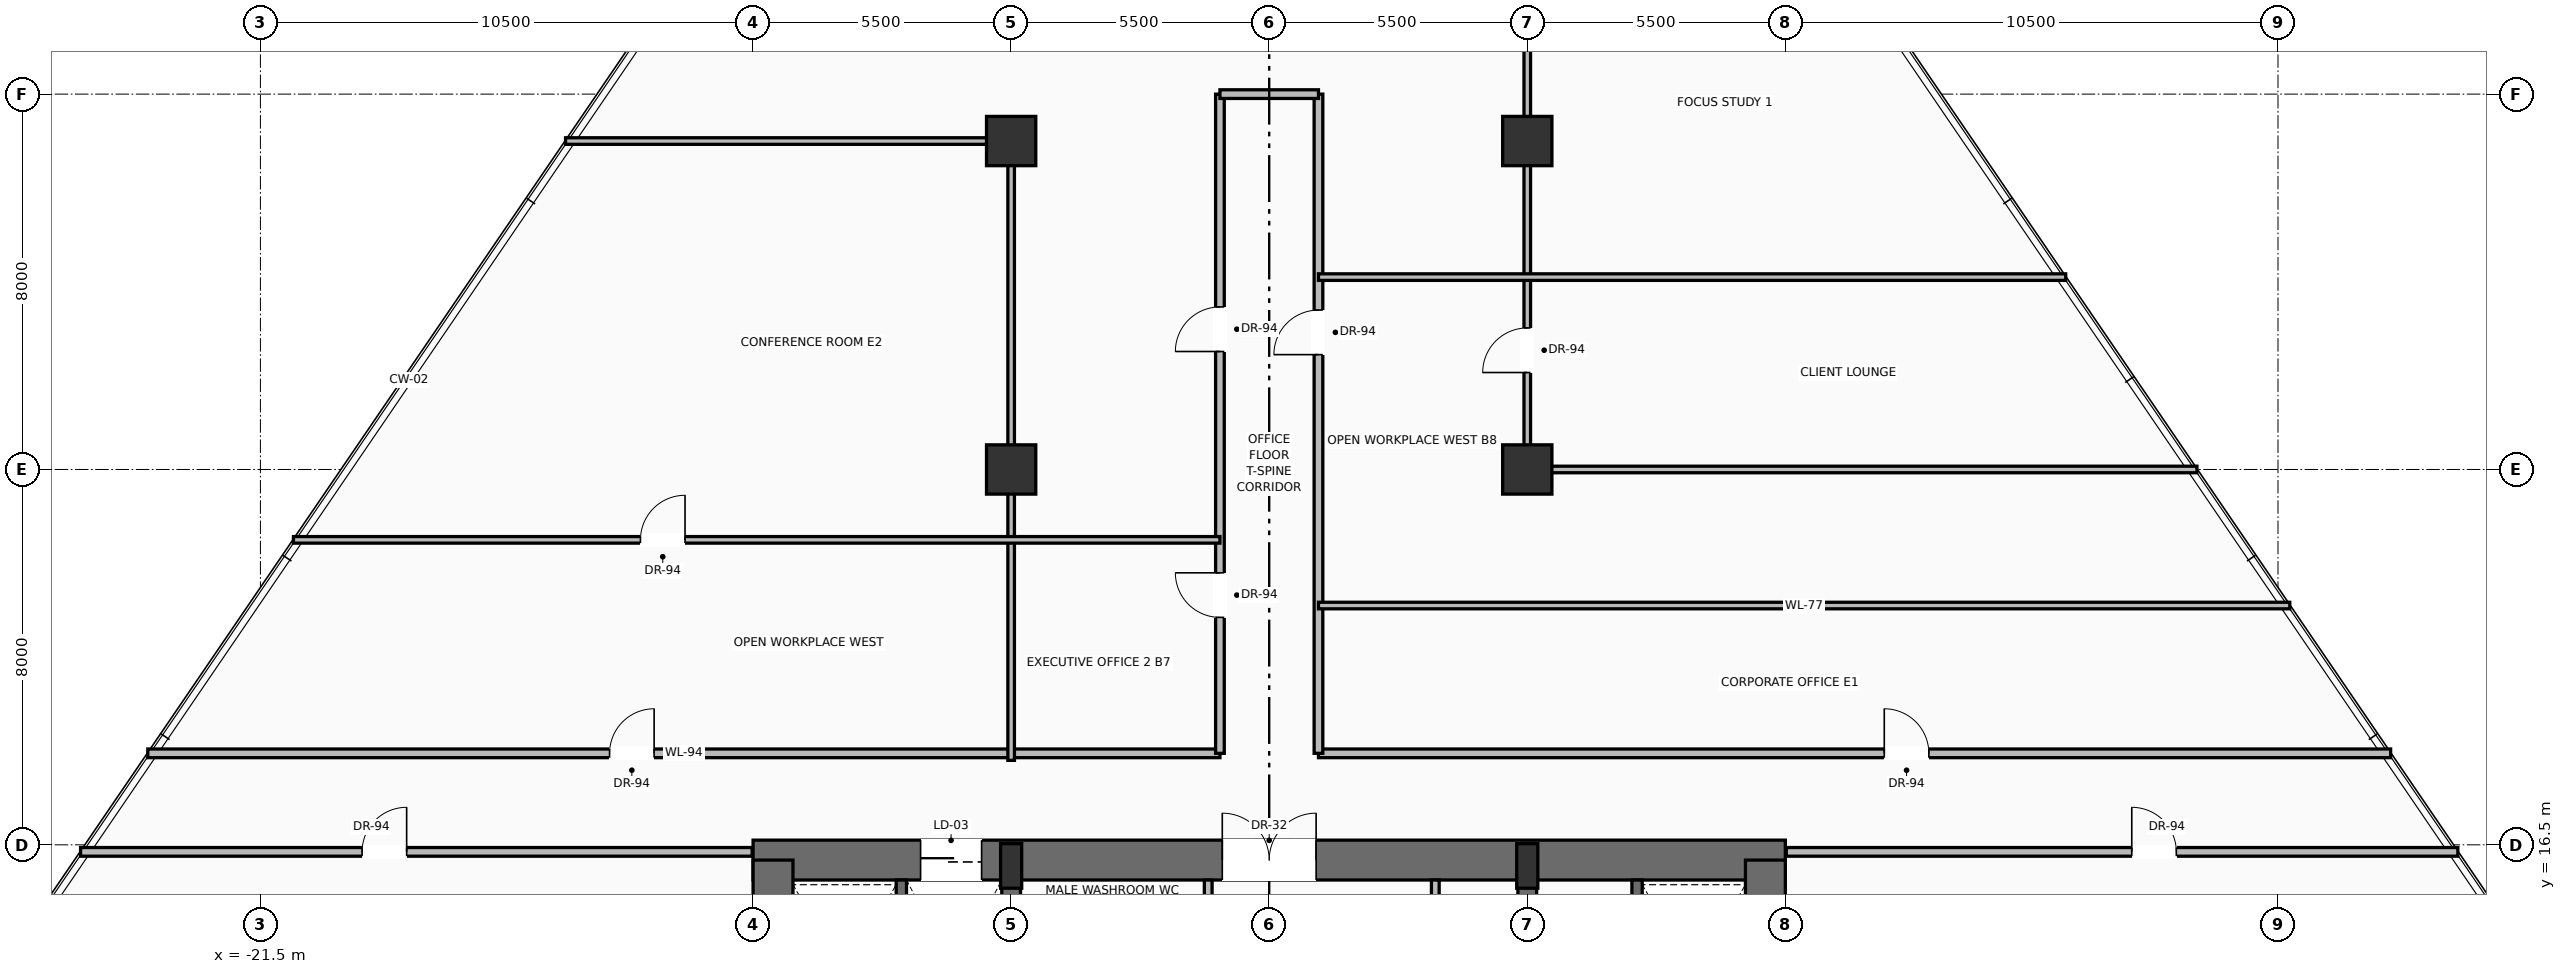
"""IFC4 building model, lengths in metres.
Left out: names, types, materials, properties, quantities, classifications, styles, units other than length and angle.
Written with IfcOpenShell. Run it as: python <this file> out.ifc"""

import sys

from ifc_helpers import new_model, si_unit, direction, frame, frame_2d, origin, origin_2d, place, context, subcontext, project, spatial, rectangle, extrude, source, transform, mapped, element, fill, save


model = new_model("IFC4")
c1 = context("Model", 3, precision=1e-05, world=origin(), true_north=direction((0.0, 1.0)))
c2 = subcontext(c1, "Body", "Model", "MODEL_VIEW")
j1 = project(units=[si_unit("LENGTHUNIT", "METRE"), si_unit("PLANEANGLEUNIT", "RADIAN")], contexts=[c1])
p1 = place(None, origin())
s1 = spatial("IfcSite", under=j1, at=p1, CompositionType="ELEMENT")
p2 = place(p1, origin())
s2 = spatial("IfcBuilding", under=s1, at=p2, CompositionType="ELEMENT")
p3 = place(p2, frame((0.0, 0.0, 27.5)))
s3 = spatial("IfcBuildingStorey", under=s2, at=p3, CompositionType="ELEMENT", Elevation=27.5)
p4 = place(p3, frame((-11.0, 16.175, 0.0), z_axis=(0.0, 0.0, 1.0), x_axis=(1.0, 0.0, 0.0)))
e1 = element("IfcWall", 1, at=p4, inside=s3, PredefinedType="SHEAR", context=c2, shape_type="SweptSolid", body=[
    extrude(rectangle(XDim=22.0, YDim=0.85, at=frame_2d((11.0, 0.0))), origin(), (0.0, 0.0, 1.0), 3.45),
])
p5 = place(p4, frame((3.57, 0.0, 0.0)))
e2 = element("IfcOpeningElement", 2, at=p5, cuts=e1, PredefinedType="OPENING", context=c2, shape_type="SweptSolid", body=[
    extrude(rectangle(XDim=1.3, YDim=2.3, at=frame_2d((0.65, 1.15))), frame((0.0, 0.435, 0.0), z_axis=(0.0, -1.0, 0.0), x_axis=(1.0, 0.0, 0.0)), (0.0, 0.0, 1.0), 0.87),
])
p6 = place(p4, frame((10.0, 0.0, 0.0)))
e3 = element("IfcOpeningElement", 3, at=p6, cuts=e1, PredefinedType="OPENING", context=c2, shape_type="SweptSolid", body=[
    extrude(rectangle(XDim=2.0, YDim=2.4, at=frame_2d((1.0, 1.2))), frame((0.0, 0.435, 0.0), z_axis=(0.0, -1.0, 0.0), x_axis=(1.0, 0.0, 0.0)), (0.0, 0.0, 1.0), 0.87),
])
for number, where, z_axis, x_axis in (
    (4, (-10.575, 0.425, 0.0), (0.0, 0.0, 1.0), (0.0, 1.0, 0.0)),
    (5, (10.575, 0.425, 0.0), (0.0, 0.0, 1.0), (0.0, 1.0, 0.0)),
):
    element("IfcWall", number, at=place(p3, frame(where, z_axis=z_axis, x_axis=x_axis)), inside=s3, PredefinedType="SHEAR", context=c2, shape_type="SweptSolid", body=[
        extrude(rectangle(XDim=15.75, YDim=0.85, at=frame_2d((7.875, 0.0))), origin(), (0.0, 0.0, 1.0), 3.45),
    ])
p7 = place(p3, frame((-5.5, 0.425, 0.0), z_axis=(0.0, 0.0, 1.0), x_axis=(0.0, 1.0, 0.0)))
e6 = element("IfcWall", 6, at=p7, inside=s3, PredefinedType="SHEAR", context=c2, shape_type="SweptSolid", body=[
    extrude(rectangle(XDim=15.75, YDim=0.4, at=frame_2d((7.875, 0.0))), origin(), (0.0, 0.0, 1.0), 3.45),
])
p8 = place(p7, frame((9.075, 0.0, 0.0)))
e7 = element("IfcOpeningElement", 7, at=p8, cuts=e6, PredefinedType="OPENING", context=c2, shape_type="SweptSolid", body=[
    extrude(rectangle(XDim=1.1, YDim=2.2, at=frame_2d((0.55, 1.1))), frame((0.0, 0.21, 0.0), z_axis=(0.0, -1.0, 0.0), x_axis=(1.0, 0.0, 0.0)), (0.0, 0.0, 1.0), 0.42),
])
p9 = place(p3, frame((5.5, 0.425, 0.0), z_axis=(0.0, 0.0, 1.0), x_axis=(0.0, 1.0, 0.0)))
e8 = element("IfcWall", 8, at=p9, inside=s3, PredefinedType="SHEAR", context=c2, shape_type="SweptSolid", body=[
    extrude(rectangle(XDim=15.75, YDim=0.4, at=frame_2d((7.875, 0.0))), origin(), (0.0, 0.0, 1.0), 3.45),
])
p10 = place(p9, frame((9.075, 0.0, 0.0)))
e9 = element("IfcOpeningElement", 9, at=p10, cuts=e8, PredefinedType="OPENING", context=c2, shape_type="SweptSolid", body=[
    extrude(rectangle(XDim=1.1, YDim=2.2, at=frame_2d((0.55, 1.1))), frame((0.0, 0.21, 0.0), z_axis=(0.0, -1.0, 0.0), x_axis=(1.0, 0.0, 0.0)), (0.0, 0.0, 1.0), 0.42),
])
m1 = source(origin(), c2, "Body", "SweptSolid", [
    extrude(rectangle(XDim=0.45, YDim=0.95, at=origin_2d()), origin(), (0.0, 0.0, 1.0), 3.7),
])
for number, where, z_axis, x_axis in (
    (10, (-5.5, 16.05, 0.0), (0.0, 0.0, 1.0), (1.0, 0.0, 0.0)),
    (11, (5.5, 16.05, 0.0), (0.0, 0.0, 1.0), (1.0, 0.0, 0.0)),
):
    element("IfcColumn", number, at=place(p3, frame(where, z_axis=z_axis, x_axis=x_axis)), inside=s3, PredefinedType="PILASTER", context=c2, shape_type="MappedRepresentation", body=[
        mapped(m1, transform((0.0, 0.0, 0.0), scale=1.0)),
    ])
m2 = source(origin(), c2, "Body", "SweptSolid", [
    extrude(rectangle(XDim=1.05, YDim=1.05, at=origin_2d()), origin(), (0.0, 0.0, 1.0), 3.7),
])
for number, where, z_axis, x_axis in (
    (12, (-5.5, 24.5, 0.0), (0.0, 0.0, 1.0), (1.0, 0.0, 0.0)),
    (13, (5.5, 24.5, 0.0), (0.0, 0.0, 1.0), (1.0, 0.0, 0.0)),
    (14, (-5.5, 31.5, 0.0), (0.0, 0.0, 1.0), (1.0, 0.0, 0.0)),
    (15, (5.5, 31.5, 0.0), (0.0, 0.0, 1.0), (1.0, 0.0, 0.0)),
):
    element("IfcColumn", number, at=place(p3, frame(where, z_axis=z_axis, x_axis=x_axis)), inside=s3, PredefinedType="COLUMN", context=c2, shape_type="MappedRepresentation", body=[
        mapped(m2, transform((0.0, 0.0, 0.0), scale=1.0)),
    ])
for number, where, z_axis, x_axis in (
    (16, (-7.84, 11.87, 0.0), (0.0, 0.0, 1.0), (0.0, 1.0, 0.0)),
    (17, (7.84, 11.87, 0.0), (0.0, 0.0, 1.0), (0.0, 1.0, 0.0)),
):
    element("IfcWall", number, at=place(p3, frame(where, z_axis=z_axis, x_axis=x_axis)), inside=s3, PredefinedType="SOLIDWALL", context=c2, shape_type="SweptSolid", body=[
        extrude(rectangle(XDim=3.88, YDim=0.22, at=frame_2d((1.94, 0.0))), origin(), (0.0, 0.0, 1.0), 3.45),
    ])
p11 = place(p3, frame((-1.3, 13.6, 0.0), z_axis=(0.0, 0.0, 1.0), x_axis=(0.0, 1.0, 0.0)))
e18 = element("IfcWall", 18, at=p11, inside=s3, PredefinedType="PARTITIONING", context=c2, shape_type="SweptSolid", body=[
    extrude(rectangle(XDim=2.15, YDim=0.165, at=frame_2d((1.075, 0.0))), origin(), (0.0, 0.0, 1.0), 3.442),
])
p12 = place(p11, frame((0.55, 0.0, 0.0)))
e19 = element("IfcOpeningElement", 19, at=p12, cuts=e18, PredefinedType="OPENING", context=c2, shape_type="SweptSolid", body=[
    extrude(rectangle(XDim=0.9, YDim=2.1, at=frame_2d((0.45, 1.05))), frame((0.0, 0.093, 0.0), z_axis=(0.0, -1.0, 0.0), x_axis=(1.0, 0.0, 0.0)), (0.0, 0.0, 1.0), 0.185),
])
p13 = place(p3, frame((3.54, 11.22, 0.0), z_axis=(0.0, 0.0, 1.0), x_axis=(0.0, 1.0, 0.0)))
e20 = element("IfcWall", 20, at=p13, inside=s3, PredefinedType="PARTITIONING", context=c2, shape_type="SweptSolid", body=[
    extrude(rectangle(XDim=4.53, YDim=0.165, at=frame_2d((2.265, 0.0))), origin(), (0.0, 0.0, 1.0), 3.442),
])
p14 = place(p13, frame((1.25, 0.0, 0.0)))
e21 = element("IfcOpeningElement", 21, at=p14, cuts=e20, PredefinedType="OPENING", context=c2, shape_type="SweptSolid", body=[
    extrude(rectangle(XDim=0.9, YDim=2.1, at=frame_2d((0.45, 1.05))), frame((0.0, 0.093, 0.0), z_axis=(0.0, -1.0, 0.0), x_axis=(1.0, 0.0, 0.0)), (0.0, 0.0, 1.0), 0.185),
])
p15 = place(p3, frame((-25.333, 16.35, 0.0), z_axis=(0.0, 0.0, 1.0), x_axis=(1.0, 0.0, 0.0)))
e22 = element("IfcWall", 22, at=p15, inside=s3, PredefinedType="PARTITIONING", context=c2, shape_type="SweptSolid", body=[
    extrude(rectangle(XDim=14.313, YDim=0.185, at=frame_2d((7.157, 0.0))), origin(), (0.0, 0.0, 1.0), 2.747),
])
p16 = place(p15, frame((6.0, 0.0, 0.0)))
e23 = element("IfcOpeningElement", 23, at=p16, cuts=e22, PredefinedType="OPENING", context=c2, shape_type="SweptSolid", body=[
    extrude(rectangle(XDim=0.95, YDim=2.2, at=frame_2d((0.475, 1.1))), frame((0.0, 0.103, 0.0), z_axis=(0.0, -1.0, 0.0), x_axis=(1.0, 0.0, 0.0)), (0.0, 0.0, 1.0), 0.205),
])
p17 = place(p3, frame((11.02, 16.35, 0.0), z_axis=(0.0, 0.0, 1.0), x_axis=(1.0, 0.0, 0.0)))
e24 = element("IfcWall", 24, at=p17, inside=s3, PredefinedType="PARTITIONING", context=c2, shape_type="SweptSolid", body=[
    extrude(rectangle(XDim=14.313, YDim=0.185, at=frame_2d((7.157, 0.0))), origin(), (0.0, 0.0, 1.0), 2.747),
])
p18 = place(p17, frame((7.363, 0.0, 0.0)))
e25 = element("IfcOpeningElement", 25, at=p18, cuts=e24, PredefinedType="OPENING", context=c2, shape_type="SweptSolid", body=[
    extrude(rectangle(XDim=0.95, YDim=2.2, at=frame_2d((0.475, 1.1))), frame((0.0, 0.103, 0.0), z_axis=(0.0, -1.0, 0.0), x_axis=(1.0, 0.0, 0.0)), (0.0, 0.0, 1.0), 0.205),
])
p19 = place(p3, frame((-23.9, 18.45, 0.0), z_axis=(0.0, 0.0, 1.0), x_axis=(1.0, 0.0, 0.0)))
e26 = element("IfcWall", 26, at=p19, inside=s3, PredefinedType="PARTITIONING", context=c2, shape_type="SweptSolid", body=[
    extrude(rectangle(XDim=22.85, YDim=0.185, at=frame_2d((11.425, 0.0))), origin(), (0.0, 0.0, 1.0), 2.747),
])
p20 = place(p19, frame((9.842, 0.0, 0.0)))
e27 = element("IfcOpeningElement", 27, at=p20, cuts=e26, PredefinedType="OPENING", context=c2, shape_type="SweptSolid", body=[
    extrude(rectangle(XDim=0.95, YDim=2.2, at=frame_2d((0.475, 1.1))), frame((0.0, 0.103, 0.0), z_axis=(0.0, -1.0, 0.0), x_axis=(1.0, 0.0, 0.0)), (0.0, 0.0, 1.0), 0.205),
])
p21 = place(p3, frame((1.05, 18.45, 0.0), z_axis=(0.0, 0.0, 1.0), x_axis=(1.0, 0.0, 0.0)))
e28 = element("IfcWall", 28, at=p21, inside=s3, PredefinedType="PARTITIONING", context=c2, shape_type="SweptSolid", body=[
    extrude(rectangle(XDim=22.85, YDim=0.185, at=frame_2d((11.425, 0.0))), origin(), (0.0, 0.0, 1.0), 2.747),
])
p22 = place(p21, frame((12.059, 0.0, 0.0)))
e29 = element("IfcOpeningElement", 29, at=p22, cuts=e28, PredefinedType="OPENING", context=c2, shape_type="SweptSolid", body=[
    extrude(rectangle(XDim=0.95, YDim=2.2, at=frame_2d((0.475, 1.1))), frame((0.0, 0.103, 0.0), z_axis=(0.0, -1.0, 0.0), x_axis=(1.0, 0.0, 0.0)), (0.0, 0.0, 1.0), 0.205),
])
p23 = place(p3, frame((-1.05, 18.45, 0.0), z_axis=(0.0, 0.0, 1.0), x_axis=(0.0, 1.0, 0.0)))
e30 = element("IfcWall", 30, at=p23, inside=s3, PredefinedType="PARTITIONING", context=c2, shape_type="SweptSolid", body=[
    extrude(rectangle(XDim=14.05, YDim=0.185, at=frame_2d((7.025, 0.0))), origin(), (0.0, 0.0, 1.0), 2.747),
])
p24 = place(p23, frame((2.897, 0.0, 0.0)))
e31 = element("IfcOpeningElement", 31, at=p24, cuts=e30, PredefinedType="OPENING", context=c2, shape_type="SweptSolid", body=[
    extrude(rectangle(XDim=0.95, YDim=2.2, at=frame_2d((0.475, 1.1))), frame((0.0, 0.103, 0.0), z_axis=(0.0, -1.0, 0.0), x_axis=(1.0, 0.0, 0.0)), (0.0, 0.0, 1.0), 0.205),
])
p25 = place(p23, frame((8.564, 0.0, 0.0)))
e32 = element("IfcOpeningElement", 32, at=p25, cuts=e30, PredefinedType="OPENING", context=c2, shape_type="SweptSolid", body=[
    extrude(rectangle(XDim=0.95, YDim=2.2, at=frame_2d((0.475, 1.1))), frame((0.0, 0.103, 0.0), z_axis=(0.0, -1.0, 0.0), x_axis=(1.0, 0.0, 0.0)), (0.0, 0.0, 1.0), 0.205),
])
p26 = place(p3, frame((1.05, 18.45, 0.0), z_axis=(0.0, 0.0, 1.0), x_axis=(0.0, 1.0, 0.0)))
e33 = element("IfcWall", 33, at=p26, inside=s3, PredefinedType="PARTITIONING", context=c2, shape_type="SweptSolid", body=[
    extrude(rectangle(XDim=14.05, YDim=0.185, at=frame_2d((7.025, 0.0))), origin(), (0.0, 0.0, 1.0), 2.747),
])
p27 = place(p26, frame((8.498, 0.0, 0.0)))
e34 = element("IfcOpeningElement", 34, at=p27, cuts=e33, PredefinedType="OPENING", context=c2, shape_type="SweptSolid", body=[
    extrude(rectangle(XDim=0.95, YDim=2.2, at=frame_2d((0.475, 1.1))), frame((0.0, 0.103, 0.0), z_axis=(0.0, -1.0, 0.0), x_axis=(1.0, 0.0, 0.0)), (0.0, 0.0, 1.0), 0.205),
])
p28 = place(p3, frame((-1.05, 32.5, 0.0), z_axis=(0.0, 0.0, 1.0), x_axis=(1.0, 0.0, 0.0)))
e35 = element("IfcWall", 35, at=p28, inside=s3, PredefinedType="PARTITIONING", context=c2, shape_type="SweptSolid", body=[
    extrude(rectangle(XDim=2.1, YDim=0.185, at=frame_2d((1.05, 0.0))), origin(), (0.0, 0.0, 1.0), 3.442),
])
p29 = place(p3, frame((-5.5, 18.3, 0.0), z_axis=(0.0, 0.0, 1.0), x_axis=(0.0, 1.0, 0.0)))
e36 = element("IfcWall", 36, at=p29, inside=s3, PredefinedType="PARTITIONING", context=c2, shape_type="SweptSolid", body=[
    extrude(rectangle(XDim=13.2, YDim=0.14, at=frame_2d((6.6, 0.0))), origin(), (0.0, 0.0, 1.0), 2.747),
])
p30 = place(p3, frame((5.5, 24.5, 0.0), z_axis=(0.0, 0.0, 1.0), x_axis=(0.0, 1.0, 0.0)))
e37 = element("IfcWall", 37, at=p30, inside=s3, PredefinedType="PARTITIONING", context=c2, shape_type="SweptSolid", body=[
    extrude(rectangle(XDim=17.22, YDim=0.14, at=frame_2d((8.61, 0.0))), origin(), (0.0, 0.0, 1.0), 2.747),
])
p31 = place(p30, frame((2.066, 0.0, 0.0)))
e38 = element("IfcOpeningElement", 38, at=p31, cuts=e37, PredefinedType="OPENING", context=c2, shape_type="SweptSolid", body=[
    extrude(rectangle(XDim=0.95, YDim=2.2, at=frame_2d((0.475, 1.1))), frame((0.0, 0.08, 0.0), z_axis=(0.0, -1.0, 0.0), x_axis=(1.0, 0.0, 0.0)), (0.0, 0.0, 1.0), 0.16),
])
p32 = place(p30, frame((11.597, 0.0, 0.0)))
e39 = element("IfcOpeningElement", 39, at=p32, cuts=e37, PredefinedType="OPENING", context=c2, shape_type="SweptSolid", body=[
    extrude(rectangle(XDim=0.95, YDim=2.2, at=frame_2d((0.475, 1.1))), frame((0.0, 0.08, 0.0), z_axis=(0.0, -1.0, 0.0), x_axis=(1.0, 0.0, 0.0)), (0.0, 0.0, 1.0), 0.16),
])
p33 = place(p3, frame((-14.997, 31.5, 0.0), z_axis=(0.0, 0.0, 1.0), x_axis=(1.0, 0.0, 0.0)))
e40 = element("IfcWall", 40, at=p33, inside=s3, PredefinedType="PARTITIONING", context=c2, shape_type="SweptSolid", body=[
    extrude(rectangle(XDim=9.497, YDim=0.14, at=frame_2d((4.749, 0.0))), origin(), (0.0, 0.0, 1.0), 2.747),
])
p34 = place(p3, frame((5.5, 24.5, 0.0), z_axis=(0.0, 0.0, 1.0), x_axis=(1.0, 0.0, 0.0)))
e41 = element("IfcWall", 41, at=p34, inside=s3, PredefinedType="PARTITIONING", context=c2, shape_type="SweptSolid", body=[
    extrude(rectangle(XDim=14.273, YDim=0.14, at=frame_2d((7.136, 0.0))), origin(), (0.0, 0.0, 1.0), 2.747),
])
p35 = place(p3, frame((-20.796, 23.0, 0.0), z_axis=(0.0, 0.0, 1.0), x_axis=(1.0, 0.0, 0.0)))
e42 = element("IfcWall", 42, at=p35, inside=s3, PredefinedType="PARTITIONING", context=c2, shape_type="SweptSolid", body=[
    extrude(rectangle(XDim=19.746, YDim=0.14, at=frame_2d((9.873, 0.0))), origin(), (0.0, 0.0, 1.0), 2.747),
])
p36 = place(p35, frame((7.396, 0.0, 0.0)))
e43 = element("IfcOpeningElement", 43, at=p36, cuts=e42, PredefinedType="OPENING", context=c2, shape_type="SweptSolid", body=[
    extrude(rectangle(XDim=0.95, YDim=2.2, at=frame_2d((0.475, 1.1))), frame((0.0, 0.08, 0.0), z_axis=(0.0, -1.0, 0.0), x_axis=(1.0, 0.0, 0.0)), (0.0, 0.0, 1.0), 0.16),
])
p37 = place(p3, frame((1.05, 21.6, 0.0), z_axis=(0.0, 0.0, 1.0), x_axis=(1.0, 0.0, 0.0)))
e44 = element("IfcWall", 44, at=p37, inside=s3, PredefinedType="PARTITIONING", context=c2, shape_type="SweptSolid", body=[
    extrude(rectangle(XDim=20.701, YDim=0.14, at=frame_2d((10.351, 0.0))), origin(), (0.0, 0.0, 1.0), 2.747),
])
p38 = place(p3, frame((1.05, 28.6, 0.0), z_axis=(0.0, 0.0, 1.0), x_axis=(1.0, 0.0, 0.0)))
e45 = element("IfcWall", 45, at=p38, inside=s3, PredefinedType="PARTITIONING", context=c2, shape_type="SweptSolid", body=[
    extrude(rectangle(XDim=15.926, YDim=0.14, at=frame_2d((7.963, 0.0))), origin(), (0.0, 0.0, 1.0), 2.747),
])
m3 = source(origin(), c2, "Body", "SweptSolid", [
    extrude(rectangle(XDim=1.3, YDim=2.3, at=frame_2d((0.65, 1.15))), frame((0.0, 0.025, 0.0), z_axis=(0.0, -1.0, 0.0), x_axis=(1.0, 0.0, 0.0)), (0.0, 0.0, 1.0), 0.05),
])
p39 = place(p5, origin())
e46 = element("IfcDoor", 46, at=p39, inside=s3, OperationType="SLIDING_TO_RIGHT", PredefinedType="DOOR", context=c2, shape_type="MappedRepresentation", body=[
    mapped(m3, transform((0.0, 0.0, 0.0), scale=1.0)),
])
fill(e2, e46)
m4 = source(origin(), c2, "Body", "SweptSolid", [
    extrude(rectangle(XDim=2.0, YDim=2.4, at=frame_2d((1.0, 1.2))), frame((0.0, 0.025, 0.0), z_axis=(0.0, -1.0, 0.0), x_axis=(1.0, 0.0, 0.0)), (0.0, 0.0, 1.0), 0.05),
])
p40 = place(p6, origin())
e47 = element("IfcDoor", 47, at=p40, inside=s3, OperationType="DOUBLE_DOOR_SINGLE_SWING", PredefinedType="DOOR", context=c2, shape_type="MappedRepresentation", body=[
    mapped(m4, transform((0.0, 0.0, 0.0), scale=1.0)),
])
fill(e3, e47)
m5 = source(origin(), c2, "Body", "SweptSolid", [
    extrude(rectangle(XDim=0.95, YDim=2.2, at=frame_2d((0.475, 1.1))), frame((0.0, 0.025, 0.0), z_axis=(0.0, -1.0, 0.0), x_axis=(1.0, 0.0, 0.0)), (0.0, 0.0, 1.0), 0.05),
])
p41 = place(p16, origin())
e48 = element("IfcDoor", 48, at=p41, inside=s3, OperationType="SINGLE_SWING_RIGHT", PredefinedType="DOOR", context=c2, shape_type="MappedRepresentation", body=[
    mapped(m5, transform((0.0, 0.0, 0.0), scale=1.0)),
])
fill(e23, e48)
p42 = place(p18, origin())
e49 = element("IfcDoor", 49, at=p42, inside=s3, OperationType="SINGLE_SWING_LEFT", PredefinedType="DOOR", context=c2, shape_type="MappedRepresentation", body=[
    mapped(m5, transform((0.0, 0.0, 0.0), scale=1.0)),
])
fill(e25, e49)
p43 = place(p20, origin())
e50 = element("IfcDoor", 50, at=p43, inside=s3, OperationType="SINGLE_SWING_RIGHT", PredefinedType="DOOR", context=c2, shape_type="MappedRepresentation", body=[
    mapped(m5, transform((0.0, 0.0, 0.0), scale=1.0)),
])
fill(e27, e50)
p44 = place(p22, origin())
e51 = element("IfcDoor", 51, at=p44, inside=s3, OperationType="SINGLE_SWING_LEFT", PredefinedType="DOOR", context=c2, shape_type="MappedRepresentation", body=[
    mapped(m5, transform((0.0, 0.0, 0.0), scale=1.0)),
])
fill(e29, e51)
p45 = place(p24, origin())
e52 = element("IfcDoor", 52, at=p45, inside=s3, OperationType="SINGLE_SWING_RIGHT", PredefinedType="DOOR", context=c2, shape_type="MappedRepresentation", body=[
    mapped(m5, transform((0.0, 0.0, 0.0), scale=1.0)),
])
fill(e31, e52)
p46 = place(p27, origin())
e53 = element("IfcDoor", 53, at=p46, inside=s3, OperationType="SINGLE_SWING_LEFT", PredefinedType="DOOR", context=c2, shape_type="MappedRepresentation", body=[
    mapped(m5, transform((0.0, 0.0, 0.0), scale=1.0)),
])
fill(e34, e53)
p47 = place(p31, origin())
e54 = element("IfcDoor", 54, at=p47, inside=s3, OperationType="SINGLE_SWING_LEFT", PredefinedType="DOOR", context=c2, shape_type="MappedRepresentation", body=[
    mapped(m5, transform((0.0, 0.0, 0.0), scale=1.0)),
])
fill(e38, e54)
p48 = place(p36, origin())
e55 = element("IfcDoor", 55, at=p48, inside=s3, OperationType="SINGLE_SWING_RIGHT", PredefinedType="DOOR", context=c2, shape_type="MappedRepresentation", body=[
    mapped(m5, transform((0.0, 0.0, 0.0), scale=1.0)),
])
fill(e43, e55)
p49 = place(p25, origin())
e56 = element("IfcDoor", 56, at=p49, inside=s3, OperationType="SINGLE_SWING_LEFT", PredefinedType="DOOR", context=c2, shape_type="MappedRepresentation", body=[
    mapped(m5, transform((0.0, 0.0, 0.0), scale=1.0)),
])
fill(e32, e56)
save(model, sys.argv[1])
